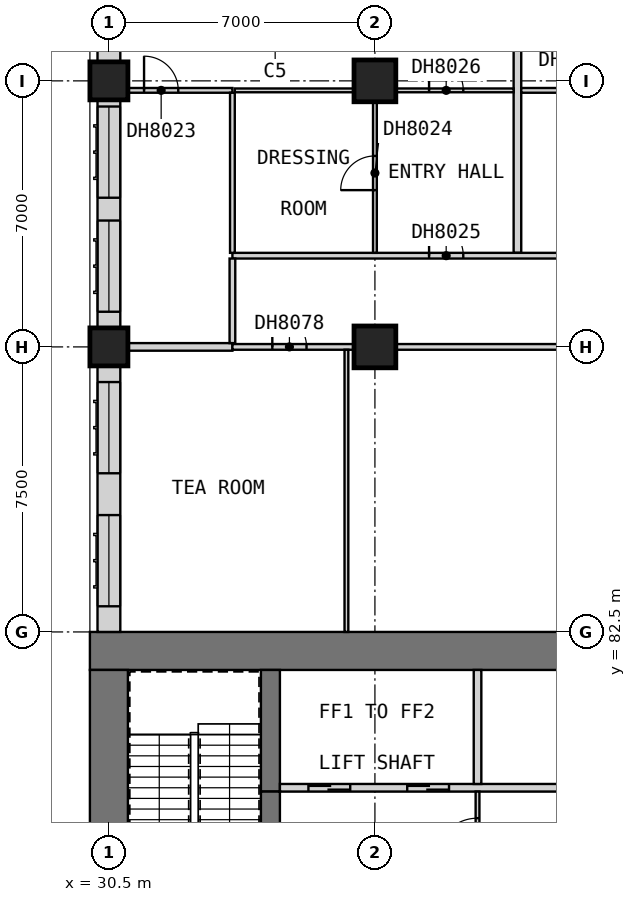
"""IFC4 building model, lengths in metres.
Left out: names, types, materials, properties, quantities, classifications, styles, units other than length and angle.
Written with IfcOpenShell. Run it as: python <this file> out.ifc"""

import sys

from ifc_helpers import new_model, si_unit, direction, frame, frame_2d, origin, origin_2d, place, context, subcontext, project, spatial, rectangle, extrude, element, fill, save


model = new_model("IFC4")
c1 = context("Model", 3, precision=1e-05, world=origin(), true_north=direction((0.0, 1.0)))
c2 = subcontext(c1, "Body", "Model", "MODEL_VIEW")
j1 = project(units=[si_unit("LENGTHUNIT", "METRE"), si_unit("PLANEANGLEUNIT", "RADIAN")], contexts=[c1])
p1 = place(None, origin())
s1 = spatial("IfcSite", under=j1, at=p1, CompositionType="ELEMENT")
p2 = place(p1, origin())
s2 = spatial("IfcBuilding", under=s1, at=p2, CompositionType="ELEMENT")
p3 = place(p2, frame((0.0, 0.0, 89.9)))
s3 = spatial("IfcBuildingStorey", under=s2, at=p3, CompositionType="ELEMENT", Elevation=89.9)
for number, where, z_axis, x_axis in (
    (1, (30.5, 90.0, 0.0), (0.0, 0.0, 1.0), (1.0, 0.0, 0.0)),
    (2, (30.5, 97.0, 0.0), (0.0, 0.0, 1.0), (1.0, 0.0, 0.0)),
):
    element("IfcColumn", number, at=place(p3, frame(where, z_axis=z_axis, x_axis=x_axis)), inside=s3, PredefinedType="COLUMN", context=c2, shape_type="SweptSolid", body=[
        extrude(rectangle(XDim=1.0, YDim=1.0, at=origin_2d()), origin(), (0.0, 0.0, 1.0), 3.6),
    ])
for number, where, z_axis, x_axis in (
    (3, (37.5, 90.0, 0.0), (0.0, 0.0, 1.0), (1.0, 0.0, 0.0)),
    (4, (37.5, 97.0, 0.0), (0.0, 0.0, 1.0), (1.0, 0.0, 0.0)),
):
    element("IfcColumn", number, at=place(p3, frame(where, z_axis=z_axis, x_axis=x_axis)), inside=s3, PredefinedType="COLUMN", context=c2, shape_type="SweptSolid", body=[
        extrude(rectangle(XDim=1.1, YDim=1.1, at=origin_2d()), origin(), (0.0, 0.0, 1.0), 3.6),
    ])
p4 = place(p3, frame((30.0, 82.0, 0.0), z_axis=(0.0, 0.0, 1.0), x_axis=(1.0, 0.0, 0.0)))
e5 = element("IfcWall", 5, at=p4, inside=s3, PredefinedType="SHEAR", context=c2, shape_type="SweptSolid", body=[
    extrude(rectangle(XDim=30.0, YDim=1.0, at=frame_2d((15.0, 0.0))), origin(), (0.0, 0.0, 1.0), 3.6),
])
p5 = place(p3, frame((30.5, 61.0, 0.0), z_axis=(0.0, 0.0, 1.0), x_axis=(0.0, 1.0, 0.0)))
e6 = element("IfcWall", 6, at=p5, inside=s3, PredefinedType="SHEAR", context=c2, shape_type="SweptSolid", body=[
    extrude(rectangle(XDim=20.5, YDim=1.0, at=frame_2d((10.25, 0.0))), origin(), (0.0, 0.0, 1.0), 3.6),
])
p6 = place(p3, frame((34.75, 78.3, 0.0), z_axis=(0.0, 0.0, 1.0), x_axis=(0.0, 1.0, 0.0)))
e7 = element("IfcWall", 7, at=p6, inside=s3, PredefinedType="SHEAR", context=c2, shape_type="SweptSolid", body=[
    extrude(rectangle(XDim=3.2, YDim=0.5, at=frame_2d((1.6, 0.0))), origin(), (0.0, 0.0, 1.0), 3.6),
])
p7 = place(p2, frame((0.0, 0.0, 34.0)))
s4 = spatial("IfcBuildingStorey", under=s2, at=p7, CompositionType="ELEMENT", Elevation=34.0)
p8 = place(p7, frame((29.7, 80.55, 0.0), z_axis=(0.0, 0.0, 1.0), x_axis=(0.0, 1.0, 0.0)))
e8 = element("IfcWall", 8, at=p8, inside=s4, PredefinedType="SOLIDWALL", context=c2, shape_type="SweptSolid", body=[
    extrude(rectangle(XDim=0.9, YDim=0.6, at=frame_2d((0.45, 0.0))), origin(), (0.0, 0.0, 1.0), 286.2),
])
p9 = place(p3, frame((30.5, 102.0, 0.0), z_axis=(0.0, 0.0, 1.0), x_axis=(0.0, -1.0, 0.0)))
e9 = element("IfcWall", 9, at=p9, inside=s3, PredefinedType="SOLIDWALL", context=c2, shape_type="SweptSolid", body=[
    extrude(rectangle(XDim=4.5, YDim=0.6, at=frame_2d((2.25, 0.0))), origin(), (0.0, 0.0, 1.0), 2.85),
])
p10 = place(p9, frame((1.5, 0.0, 0.8)))
e10 = element("IfcOpeningElement", 10, at=p10, cuts=e9, PredefinedType="OPENING", context=c2, shape_type="SweptSolid", body=[
    extrude(rectangle(XDim=2.4, YDim=1.8, at=frame_2d((1.2, 0.9))), frame((0.0, 0.31, 0.0), z_axis=(0.0, -1.0, 0.0), x_axis=(1.0, 0.0, 0.0)), (0.0, 0.0, 1.0), 0.62),
])
p11 = place(p3, frame((30.5, 96.5, 0.0), z_axis=(0.0, 0.0, 1.0), x_axis=(0.0, -1.0, 0.0)))
e11 = element("IfcWall", 11, at=p11, inside=s3, PredefinedType="SOLIDWALL", context=c2, shape_type="SweptSolid", body=[
    extrude(rectangle(XDim=6.0, YDim=0.6, at=frame_2d((3.0, 0.0))), origin(), (0.0, 0.0, 1.0), 2.85),
])
p12 = place(p11, frame((3.175, 0.0, 0.8)))
e12 = element("IfcOpeningElement", 12, at=p12, cuts=e11, PredefinedType="OPENING", context=c2, shape_type="SweptSolid", body=[
    extrude(rectangle(XDim=2.4, YDim=1.8, at=frame_2d((1.2, 0.9))), frame((0.0, 0.31, 0.0), z_axis=(0.0, -1.0, 0.0), x_axis=(1.0, 0.0, 0.0)), (0.0, 0.0, 1.0), 0.62),
])
p13 = place(p11, frame((0.175, 0.0, 0.8)))
e13 = element("IfcOpeningElement", 13, at=p13, cuts=e11, PredefinedType="OPENING", context=c2, shape_type="SweptSolid", body=[
    extrude(rectangle(XDim=2.4, YDim=1.8, at=frame_2d((1.2, 0.9))), frame((0.0, 0.31, 0.0), z_axis=(0.0, -1.0, 0.0), x_axis=(1.0, 0.0, 0.0)), (0.0, 0.0, 1.0), 0.62),
])
p14 = place(p3, frame((30.5, 89.5, 0.0), z_axis=(0.0, 0.0, 1.0), x_axis=(0.0, -1.0, 0.0)))
e14 = element("IfcWall", 14, at=p14, inside=s3, PredefinedType="SOLIDWALL", context=c2, shape_type="SweptSolid", body=[
    extrude(rectangle(XDim=7.0, YDim=0.6, at=frame_2d((3.5, 0.0))), origin(), (0.0, 0.0, 1.0), 3.35),
])
p15 = place(p14, frame((3.925, 0.0, 0.8)))
e15 = element("IfcOpeningElement", 15, at=p15, cuts=e14, PredefinedType="OPENING", context=c2, shape_type="SweptSolid", body=[
    extrude(rectangle(XDim=2.4, YDim=1.8, at=frame_2d((1.2, 0.9))), frame((0.0, 0.31, 0.0), z_axis=(0.0, -1.0, 0.0), x_axis=(1.0, 0.0, 0.0)), (0.0, 0.0, 1.0), 0.62),
])
p16 = place(p14, frame((0.425, 0.0, 0.8)))
e16 = element("IfcOpeningElement", 16, at=p16, cuts=e14, PredefinedType="OPENING", context=c2, shape_type="SweptSolid", body=[
    extrude(rectangle(XDim=2.4, YDim=1.8, at=frame_2d((1.2, 0.9))), frame((0.0, 0.31, 0.0), z_axis=(0.0, -1.0, 0.0), x_axis=(1.0, 0.0, 0.0)), (0.0, 0.0, 1.0), 0.62),
])
p17 = place(p3, frame((35.0, 78.4, 0.0), z_axis=(0.0, 0.0, 1.0), x_axis=(1.0, 0.0, 0.0)))
e17 = element("IfcWall", 17, at=p17, inside=s3, PredefinedType="SOLIDWALL", context=c2, shape_type="SweptSolid", body=[
    extrude(rectangle(XDim=15.6, YDim=0.2, at=frame_2d((7.8, 0.0))), origin(), (0.0, 0.0, 1.0), 3.6),
])
p18 = place(p17, frame((0.75, 0.0, 0.0)))
e18 = element("IfcOpeningElement", 18, at=p18, cuts=e17, PredefinedType="OPENING", context=c2, shape_type="SweptSolid", body=[
    extrude(rectangle(XDim=1.1, YDim=2.1, at=frame_2d((0.55, 1.05))), frame((0.0, 0.11, 0.0), z_axis=(0.0, -1.0, 0.0), x_axis=(1.0, 0.0, 0.0)), (0.0, 0.0, 1.0), 0.22),
])
p19 = place(p17, frame((3.35, 0.0, 0.0)))
e19 = element("IfcOpeningElement", 19, at=p19, cuts=e17, PredefinedType="OPENING", context=c2, shape_type="SweptSolid", body=[
    extrude(rectangle(XDim=1.1, YDim=2.1, at=frame_2d((0.55, 1.05))), frame((0.0, 0.11, 0.0), z_axis=(0.0, -1.0, 0.0), x_axis=(1.0, 0.0, 0.0)), (0.0, 0.0, 1.0), 0.22),
])
p20 = place(p17, frame((11.15, 0.0, 0.0)))
e20 = element("IfcOpeningElement", 20, at=p20, cuts=e17, PredefinedType="OPENING", context=c2, shape_type="SweptSolid", body=[
    extrude(rectangle(XDim=1.1, YDim=2.1, at=frame_2d((0.55, 1.05))), frame((0.0, 0.11, 0.0), z_axis=(0.0, -1.0, 0.0), x_axis=(1.0, 0.0, 0.0)), (0.0, 0.0, 1.0), 0.22),
])
p21 = place(p17, frame((13.75, 0.0, 0.0)))
e21 = element("IfcOpeningElement", 21, at=p21, cuts=e17, PredefinedType="OPENING", context=c2, shape_type="SweptSolid", body=[
    extrude(rectangle(XDim=1.1, YDim=2.1, at=frame_2d((0.55, 1.05))), frame((0.0, 0.11, 0.0), z_axis=(0.0, -1.0, 0.0), x_axis=(1.0, 0.0, 0.0)), (0.0, 0.0, 1.0), 0.22),
])
p22 = place(p3, frame((40.2, 78.5, 0.0), z_axis=(0.0, 0.0, 1.0), x_axis=(0.0, 1.0, 0.0)))
e22 = element("IfcWall", 22, at=p22, inside=s3, PredefinedType="SOLIDWALL", context=c2, shape_type="SweptSolid", body=[
    extrude(rectangle(XDim=3.0, YDim=0.2, at=frame_2d((1.5, 0.0))), origin(), (0.0, 0.0, 1.0), 3.6),
])
p23 = place(p3, frame((40.2, 75.3, 0.0), z_axis=(0.0, 0.0, 1.0), x_axis=(0.0, 1.0, 0.0)))
e23 = element("IfcWall", 23, at=p23, inside=s3, PredefinedType="PARTITIONING", context=c2, shape_type="SweptSolid", body=[
    extrude(rectangle(XDim=3.0, YDim=0.1, at=frame_2d((1.5, 0.0))), origin(), (0.0, 0.0, 1.0), 3.35),
])
p24 = place(p23, frame((1.2, 0.0, 0.0)))
e24 = element("IfcOpeningElement", 24, at=p24, cuts=e23, PredefinedType="OPENING", context=c2, shape_type="SweptSolid", body=[
    extrude(rectangle(XDim=1.1, YDim=2.1, at=frame_2d((0.55, 1.05))), frame((0.0, 0.06, 0.0), z_axis=(0.0, -1.0, 0.0), x_axis=(1.0, 0.0, 0.0)), (0.0, 0.0, 1.0), 0.12),
])
p25 = place(p3, frame((34.75, 74.45, 0.0), z_axis=(0.0, 0.0, 1.0), x_axis=(0.0, 1.0, 0.0)))
e25 = element("IfcWall", 25, at=p25, inside=s3, PredefinedType="SOLIDWALL", context=c2, shape_type="SweptSolid", body=[
    extrude(rectangle(XDim=3.85, YDim=0.5, at=frame_2d((1.925, 0.0))), origin(), (0.0, 0.0, 1.0), 2.4),
])
p26 = place(p25, frame((1.0, 0.0, 0.0)))
e26 = element("IfcOpeningElement", 26, at=p26, cuts=e25, PredefinedType="OPENING", context=c2, shape_type="SweptSolid", body=[
    extrude(rectangle(XDim=1.2, YDim=2.1, at=frame_2d((0.6, 1.05))), frame((0.0, 0.26, 0.0), z_axis=(0.0, -1.0, 0.0), x_axis=(1.0, 0.0, 0.0)), (0.0, 0.0, 1.0), 0.52),
])
p27 = place(p3, frame((30.0, 90.0, 0.0), z_axis=(0.0, 0.0, 1.0), x_axis=(1.0, 0.0, 0.0)))
e27 = element("IfcWall", 27, at=p27, inside=s3, PredefinedType="PARTITIONING", context=c2, shape_type="SweptSolid", body=[
    extrude(rectangle(XDim=3.75, YDim=0.2, at=frame_2d((1.875, 0.0))), origin(), (0.0, 0.0, 1.0), 3.35),
])
p28 = place(p3, frame((41.25, 92.475, 0.0), z_axis=(0.0, 0.0, 1.0), x_axis=(0.0, 1.0, 0.0)))
e28 = element("IfcWall", 28, at=p28, inside=s3, PredefinedType="PARTITIONING", context=c2, shape_type="SweptSolid", body=[
    extrude(rectangle(XDim=11.715, YDim=0.2, at=frame_2d((5.857, 0.0))), origin(), (0.0, 0.0, 1.0), 3.35),
])
p29 = place(p3, frame((33.75, 90.0, 0.0), z_axis=(0.0, 0.0, 1.0), x_axis=(1.0, 0.0, 0.0)))
e29 = element("IfcWall", 29, at=p29, inside=s3, PredefinedType="PARTITIONING", context=c2, shape_type="SweptSolid", body=[
    extrude(rectangle(XDim=41.25, YDim=0.15, at=frame_2d((20.625, 0.0))), origin(), (0.0, 0.0, 1.0), 3.35),
])
p30 = place(p29, frame((1.05, 0.0, 0.0)))
e30 = element("IfcOpeningElement", 30, at=p30, cuts=e29, PredefinedType="OPENING", context=c2, shape_type="SweptSolid", body=[
    extrude(rectangle(XDim=0.9, YDim=2.1, at=frame_2d((0.45, 1.05))), frame((0.0, 0.085, 0.0), z_axis=(0.0, -1.0, 0.0), x_axis=(1.0, 0.0, 0.0)), (0.0, 0.0, 1.0), 0.17),
])
p31 = place(p29, frame((14.55, 0.0, 0.0)))
e31 = element("IfcOpeningElement", 31, at=p31, cuts=e29, PredefinedType="OPENING", context=c2, shape_type="SweptSolid", body=[
    extrude(rectangle(XDim=0.9, YDim=2.1, at=frame_2d((0.45, 1.05))), frame((0.0, 0.085, 0.0), z_axis=(0.0, -1.0, 0.0), x_axis=(1.0, 0.0, 0.0)), (0.0, 0.0, 1.0), 0.17),
])
p32 = place(p29, frame((28.275, 0.0, 0.0)))
e32 = element("IfcOpeningElement", 32, at=p32, cuts=e29, PredefinedType="OPENING", context=c2, shape_type="SweptSolid", body=[
    extrude(rectangle(XDim=0.9, YDim=2.1, at=frame_2d((0.45, 1.05))), frame((0.0, 0.085, 0.0), z_axis=(0.0, -1.0, 0.0), x_axis=(1.0, 0.0, 0.0)), (0.0, 0.0, 1.0), 0.17),
])
p33 = place(p3, frame((33.75, 92.4, 0.0), z_axis=(0.0, 0.0, 1.0), x_axis=(1.0, 0.0, 0.0)))
e33 = element("IfcWall", 33, at=p33, inside=s3, PredefinedType="PARTITIONING", context=c2, shape_type="SweptSolid", body=[
    extrude(rectangle(XDim=43.65, YDim=0.15, at=frame_2d((21.825, 0.0))), origin(), (0.0, 0.0, 1.0), 3.35),
])
p34 = place(p33, frame((5.175, 0.0, 0.0)))
e34 = element("IfcOpeningElement", 34, at=p34, cuts=e33, PredefinedType="OPENING", context=c2, shape_type="SweptSolid", body=[
    extrude(rectangle(XDim=0.9, YDim=2.1, at=frame_2d((0.45, 1.05))), frame((0.0, 0.085, 0.0), z_axis=(0.0, -1.0, 0.0), x_axis=(1.0, 0.0, 0.0)), (0.0, 0.0, 1.0), 0.17),
])
p35 = place(p33, frame((13.05, 0.0, 0.0)))
e35 = element("IfcOpeningElement", 35, at=p35, cuts=e33, PredefinedType="OPENING", context=c2, shape_type="SweptSolid", body=[
    extrude(rectangle(XDim=0.9, YDim=2.1, at=frame_2d((0.45, 1.05))), frame((0.0, 0.085, 0.0), z_axis=(0.0, -1.0, 0.0), x_axis=(1.0, 0.0, 0.0)), (0.0, 0.0, 1.0), 0.17),
])
p36 = place(p33, frame((20.55, 0.0, 0.0)))
e36 = element("IfcOpeningElement", 36, at=p36, cuts=e33, PredefinedType="OPENING", context=c2, shape_type="SweptSolid", body=[
    extrude(rectangle(XDim=0.9, YDim=2.1, at=frame_2d((0.45, 1.05))), frame((0.0, 0.085, 0.0), z_axis=(0.0, -1.0, 0.0), x_axis=(1.0, 0.0, 0.0)), (0.0, 0.0, 1.0), 0.17),
])
p37 = place(p33, frame((32.363, 0.0, 0.0)))
e37 = element("IfcOpeningElement", 37, at=p37, cuts=e33, PredefinedType="OPENING", context=c2, shape_type="SweptSolid", body=[
    extrude(rectangle(XDim=0.9, YDim=2.1, at=frame_2d((0.45, 1.05))), frame((0.0, 0.085, 0.0), z_axis=(0.0, -1.0, 0.0), x_axis=(1.0, 0.0, 0.0)), (0.0, 0.0, 1.0), 0.17),
])
p38 = place(p33, frame((39.3, 0.0, 0.0)))
e38 = element("IfcOpeningElement", 38, at=p38, cuts=e33, PredefinedType="OPENING", context=c2, shape_type="SweptSolid", body=[
    extrude(rectangle(XDim=0.9, YDim=2.1, at=frame_2d((0.45, 1.05))), frame((0.0, 0.085, 0.0), z_axis=(0.0, -1.0, 0.0), x_axis=(1.0, 0.0, 0.0)), (0.0, 0.0, 1.0), 0.17),
])
p39 = place(p33, frame((42.0, 0.0, 0.0)))
e39 = element("IfcOpeningElement", 39, at=p39, cuts=e33, PredefinedType="OPENING", context=c2, shape_type="SweptSolid", body=[
    extrude(rectangle(XDim=0.9, YDim=2.1, at=frame_2d((0.45, 1.05))), frame((0.0, 0.085, 0.0), z_axis=(0.0, -1.0, 0.0), x_axis=(1.0, 0.0, 0.0)), (0.0, 0.0, 1.0), 0.17),
])
p40 = place(p3, frame((33.75, 90.1, 0.0), z_axis=(0.0, 0.0, 1.0), x_axis=(0.0, 1.0, 0.0)))
e40 = element("IfcWall", 40, at=p40, inside=s3, PredefinedType="PARTITIONING", context=c2, shape_type="SweptSolid", body=[
    extrude(rectangle(XDim=2.225, YDim=0.15, at=frame_2d((1.112, 0.0))), origin(), (0.0, 0.0, 1.0), 3.35),
])
p41 = place(p3, frame((33.812, 96.75, 0.0), z_axis=(0.0, 0.0, 1.0), x_axis=(1.0, 0.0, 0.0)))
e41 = element("IfcWall", 41, at=p41, inside=s3, PredefinedType="PARTITIONING", context=c2, shape_type="SweptSolid", body=[
    extrude(rectangle(XDim=7.337, YDim=0.1, at=frame_2d((3.669, 0.0))), origin(), (0.0, 0.0, 1.0), 3.35),
])
p42 = place(p41, frame((5.113, 0.0, 0.0)))
e42 = element("IfcOpeningElement", 42, at=p42, cuts=e41, PredefinedType="OPENING", context=c2, shape_type="SweptSolid", body=[
    extrude(rectangle(XDim=0.9, YDim=2.1, at=frame_2d((0.45, 1.05))), frame((0.0, 0.06, 0.0), z_axis=(0.0, -1.0, 0.0), x_axis=(1.0, 0.0, 0.0)), (0.0, 0.0, 1.0), 0.12),
])
p43 = place(p3, frame((36.75, 82.5, 0.0), z_axis=(0.0, 0.0, 1.0), x_axis=(0.0, 1.0, 0.0)))
e43 = element("IfcWall", 43, at=p43, inside=s3, PredefinedType="PARTITIONING", context=c2, shape_type="SweptSolid", body=[
    extrude(rectangle(XDim=7.425, YDim=0.1, at=frame_2d((3.712, 0.0))), origin(), (0.0, 0.0, 1.0), 3.35),
])
p44 = place(p3, frame((37.5, 92.475, 0.0), z_axis=(0.0, 0.0, 1.0), x_axis=(0.0, 1.0, 0.0)))
e44 = element("IfcWall", 44, at=p44, inside=s3, PredefinedType="PARTITIONING", context=c2, shape_type="SweptSolid", body=[
    extrude(rectangle(XDim=4.225, YDim=0.1, at=frame_2d((2.112, 0.0))), origin(), (0.0, 0.0, 1.0), 3.35),
])
p45 = place(p44, frame((1.65, 0.0, 0.0)))
e45 = element("IfcOpeningElement", 45, at=p45, cuts=e44, PredefinedType="OPENING", context=c2, shape_type="SweptSolid", body=[
    extrude(rectangle(XDim=0.9, YDim=2.1, at=frame_2d((0.45, 1.05))), frame((0.0, 0.06, 0.0), z_axis=(0.0, -1.0, 0.0), x_axis=(1.0, 0.0, 0.0)), (0.0, 0.0, 1.0), 0.12),
])
p46 = place(p3, frame((30.0, 96.75, 0.0), z_axis=(0.0, 0.0, 1.0), x_axis=(1.0, 0.0, 0.0)))
e46 = element("IfcWall", 46, at=p46, inside=s3, PredefinedType="PARTITIONING", context=c2, shape_type="SweptSolid", body=[
    extrude(rectangle(XDim=3.75, YDim=0.125, at=frame_2d((1.875, 0.0))), origin(), (0.0, 0.0, 1.0), 3.35),
])
p47 = place(p46, frame((1.425, 0.0, 0.0)))
e47 = element("IfcOpeningElement", 47, at=p47, cuts=e46, PredefinedType="OPENING", context=c2, shape_type="SweptSolid", body=[
    extrude(rectangle(XDim=0.9, YDim=2.1, at=frame_2d((0.45, 1.05))), frame((0.0, 0.073, 0.0), z_axis=(0.0, -1.0, 0.0), x_axis=(1.0, 0.0, 0.0)), (0.0, 0.0, 1.0), 0.145),
])
p48 = place(p3, frame((41.35, 96.75, 0.0), z_axis=(0.0, 0.0, 1.0), x_axis=(1.0, 0.0, 0.0)))
e48 = element("IfcWall", 48, at=p48, inside=s3, PredefinedType="PARTITIONING", context=c2, shape_type="SweptSolid", body=[
    extrude(rectangle(XDim=4.4, YDim=0.125, at=frame_2d((2.2, 0.0))), origin(), (0.0, 0.0, 1.0), 3.35),
])
p49 = place(p48, frame((1.7, 0.0, 0.0)))
e49 = element("IfcOpeningElement", 49, at=p49, cuts=e48, PredefinedType="OPENING", context=c2, shape_type="SweptSolid", body=[
    extrude(rectangle(XDim=0.9, YDim=2.1, at=frame_2d((0.45, 1.05))), frame((0.0, 0.073, 0.0), z_axis=(0.0, -1.0, 0.0), x_axis=(1.0, 0.0, 0.0)), (0.0, 0.0, 1.0), 0.145),
])
p50 = place(p3, frame((33.75, 92.475, 0.0), z_axis=(0.0, 0.0, 1.0), x_axis=(0.0, 1.0, 0.0)))
e50 = element("IfcWall", 50, at=p50, inside=s3, PredefinedType="PARTITIONING", context=c2, shape_type="SweptSolid", body=[
    extrude(rectangle(XDim=4.212, YDim=0.125, at=frame_2d((2.106, 0.0))), origin(), (0.0, 0.0, 1.0), 3.35),
])
p51 = place(p12, origin())
e51 = element("IfcWindow", 51, at=p51, inside=s3, PartitioningType="SINGLE_PANEL", PredefinedType="WINDOW", context=c2, shape_type="SweptSolid", body=[
    extrude(rectangle(XDim=2.4, YDim=1.8, at=frame_2d((1.2, 0.9))), frame((0.0, -0.07, 0.0), z_axis=(0.0, -1.0, 0.0), x_axis=(1.0, 0.0, 0.0)), (0.0, 0.0, 1.0), 0.06),
])
fill(e12, e51)
p52 = place(p13, origin())
e52 = element("IfcWindow", 52, at=p52, inside=s3, PartitioningType="SINGLE_PANEL", PredefinedType="WINDOW", context=c2, shape_type="SweptSolid", body=[
    extrude(rectangle(XDim=2.4, YDim=1.8, at=frame_2d((1.2, 0.9))), frame((0.0, -0.07, 0.0), z_axis=(0.0, -1.0, 0.0), x_axis=(1.0, 0.0, 0.0)), (0.0, 0.0, 1.0), 0.06),
])
fill(e13, e52)
p53 = place(p15, origin())
e53 = element("IfcWindow", 53, at=p53, inside=s3, PartitioningType="SINGLE_PANEL", PredefinedType="WINDOW", context=c2, shape_type="SweptSolid", body=[
    extrude(rectangle(XDim=2.4, YDim=1.8, at=frame_2d((1.2, 0.9))), frame((0.0, -0.07, 0.0), z_axis=(0.0, -1.0, 0.0), x_axis=(1.0, 0.0, 0.0)), (0.0, 0.0, 1.0), 0.06),
])
fill(e15, e53)
p54 = place(p16, origin())
e54 = element("IfcWindow", 54, at=p54, inside=s3, PartitioningType="SINGLE_PANEL", PredefinedType="WINDOW", context=c2, shape_type="SweptSolid", body=[
    extrude(rectangle(XDim=2.4, YDim=1.8, at=frame_2d((1.2, 0.9))), frame((0.0, -0.07, 0.0), z_axis=(0.0, -1.0, 0.0), x_axis=(1.0, 0.0, 0.0)), (0.0, 0.0, 1.0), 0.06),
])
fill(e16, e54)
p55 = place(p18, origin())
e55 = element("IfcDoor", 55, at=p55, inside=s3, OperationType="DOUBLE_DOOR_SLIDING", PredefinedType="DOOR", context=c2, shape_type="SweptSolid", body=[
    extrude(rectangle(XDim=1.1, YDim=2.1, at=frame_2d((0.55, 1.05))), frame((0.0, 0.025, 0.0), z_axis=(0.0, -1.0, 0.0), x_axis=(1.0, 0.0, 0.0)), (0.0, 0.0, 1.0), 0.05),
])
fill(e18, e55)
p56 = place(p19, origin())
e56 = element("IfcDoor", 56, at=p56, inside=s3, OperationType="DOUBLE_DOOR_SLIDING", PredefinedType="DOOR", context=c2, shape_type="SweptSolid", body=[
    extrude(rectangle(XDim=1.1, YDim=2.1, at=frame_2d((0.55, 1.05))), frame((0.0, 0.025, 0.0), z_axis=(0.0, -1.0, 0.0), x_axis=(1.0, 0.0, 0.0)), (0.0, 0.0, 1.0), 0.05),
])
fill(e19, e56)
p57 = place(p24, origin())
e57 = element("IfcDoor", 57, at=p57, inside=s3, OperationType="SINGLE_SWING_LEFT", PredefinedType="DOOR", context=c2, shape_type="SweptSolid", body=[
    extrude(rectangle(XDim=1.1, YDim=2.1, at=frame_2d((0.55, 1.05))), frame((0.0, 0.025, 0.0), z_axis=(0.0, -1.0, 0.0), x_axis=(1.0, 0.0, 0.0)), (0.0, 0.0, 1.0), 0.05),
])
fill(e24, e57)
p58 = place(p47, origin())
e58 = element("IfcDoor", 58, at=p58, inside=s3, OperationType="SINGLE_SWING_RIGHT", PredefinedType="DOOR", context=c2, shape_type="SweptSolid", body=[
    extrude(rectangle(XDim=0.9, YDim=2.1, at=frame_2d((0.45, 1.05))), frame((0.0, 0.025, 0.0), z_axis=(0.0, -1.0, 0.0), x_axis=(1.0, 0.0, 0.0)), (0.0, 0.0, 1.0), 0.05),
])
fill(e47, e58)
p59 = place(p45, origin())
e59 = element("IfcDoor", 59, at=p59, inside=s3, OperationType="SINGLE_SWING_RIGHT", PredefinedType="DOOR", context=c2, shape_type="SweptSolid", body=[
    extrude(rectangle(XDim=0.9, YDim=2.1, at=frame_2d((0.45, 1.05))), frame((0.0, 0.025, 0.0), z_axis=(0.0, -1.0, 0.0), x_axis=(1.0, 0.0, 0.0)), (0.0, 0.0, 1.0), 0.05),
])
fill(e45, e59)
p60 = place(p34, origin())
e60 = element("IfcDoor", 60, at=p60, inside=s3, OperationType="SINGLE_SWING_LEFT", PredefinedType="DOOR", context=c2, shape_type="SweptSolid", body=[
    extrude(rectangle(XDim=0.9, YDim=2.1, at=frame_2d((0.45, 1.05))), frame((0.0, 0.025, 0.0), z_axis=(0.0, -1.0, 0.0), x_axis=(1.0, 0.0, 0.0)), (0.0, 0.0, 1.0), 0.05),
])
fill(e34, e60)
p61 = place(p42, origin())
e61 = element("IfcDoor", 61, at=p61, inside=s3, OperationType="SINGLE_SWING_RIGHT", PredefinedType="DOOR", context=c2, shape_type="SweptSolid", body=[
    extrude(rectangle(XDim=0.9, YDim=2.1, at=frame_2d((0.45, 1.05))), frame((0.0, 0.025, 0.0), z_axis=(0.0, -1.0, 0.0), x_axis=(1.0, 0.0, 0.0)), (0.0, 0.0, 1.0), 0.05),
])
fill(e42, e61)
p62 = place(p30, origin())
e62 = element("IfcDoor", 62, at=p62, inside=s3, OperationType="SINGLE_SWING_RIGHT", PredefinedType="DOOR", context=c2, shape_type="SweptSolid", body=[
    extrude(rectangle(XDim=0.9, YDim=2.1, at=frame_2d((0.45, 1.05))), frame((0.0, 0.025, 0.0), z_axis=(0.0, -1.0, 0.0), x_axis=(1.0, 0.0, 0.0)), (0.0, 0.0, 1.0), 0.05),
])
fill(e30, e62)
save(model, sys.argv[1])
